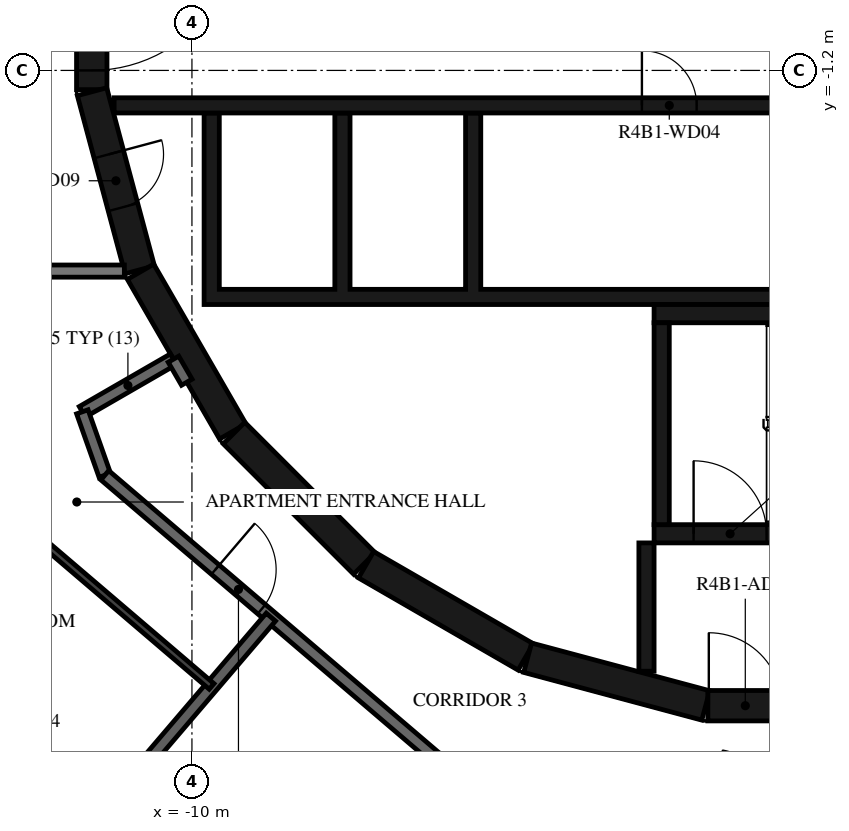
"""IFC4 building model, lengths in metres.
Left out: names, types, materials, properties, quantities, classifications, styles, units other than length and angle.
Written with IfcOpenShell. Run it as: python <this file> out.ifc"""

import sys

from ifc_helpers import new_model, si_unit, direction, frame, frame_2d, origin, place, context, subcontext, project, spatial, polyline, rectangle, outline, extrude, element, fill, save


model = new_model("IFC4")
c1 = context("Model", 3, precision=1e-05, world=origin(), true_north=direction((0.0, 1.0)))
c2 = subcontext(c1, "Body", "Model", "MODEL_VIEW")
j1 = project(units=[si_unit("LENGTHUNIT", "METRE"), si_unit("PLANEANGLEUNIT", "RADIAN")], contexts=[c1])
p1 = place(None, origin())
s1 = spatial("IfcSite", under=j1, at=p1, CompositionType="ELEMENT")
p2 = place(p1, origin())
s2 = spatial("IfcBuilding", under=s1, at=p2, CompositionType="ELEMENT")
p3 = place(p2, frame((0.0, 0.0, 162.2)))
s3 = spatial("IfcBuildingStorey", under=s2, at=p3, CompositionType="ELEMENT", Elevation=162.2)
p4 = place(p3, frame((-11.647, 1.516, 0.0), z_axis=(0.0, 0.0, 1.0), x_axis=(0.0, -1.0, 0.0)))
e1 = element("IfcWall", 1, at=p4, inside=s3, PredefinedType="SHEAR", context=c2, shape_type="SweptSolid", body=[
    extrude(rectangle(XDim=3.033, YDim=0.5, at=frame_2d((1.516, 0.0))), origin(), (0.0, 0.0, 1.0), 3.12),
])
p5 = place(p4, frame((0.316, 0.0, 0.0)))
e2 = element("IfcOpeningElement", 2, at=p5, cuts=e1, PredefinedType="OPENING", context=c2, shape_type="SweptSolid", body=[
    extrude(rectangle(XDim=2.4, YDim=2.1, at=frame_2d((1.2, 1.05))), frame((0.0, 0.26, 0.0), z_axis=(0.0, -1.0, 0.0), x_axis=(1.0, 0.0, 0.0)), (0.0, 0.0, 1.0), 0.52),
])
p6 = place(p3, frame((-11.643, -1.55, 0.0), z_axis=(0.0, 0.0, 1.0), x_axis=(0.258734743916, -0.965948410781, 0.0)))
e3 = element("IfcWall", 3, at=p6, inside=s3, PredefinedType="SHEAR", context=c2, shape_type="SweptSolid", body=[
    extrude(rectangle(XDim=3.033, YDim=0.5, at=frame_2d((1.516, 0.0))), origin(), (0.0, 0.0, 1.0), 3.12),
])
p7 = place(p6, frame((1.066, 0.0, 0.0)))
e4 = element("IfcOpeningElement", 4, at=p7, cuts=e3, PredefinedType="OPENING", context=c2, shape_type="SweptSolid", body=[
    extrude(rectangle(XDim=0.9, YDim=2.1, at=frame_2d((0.45, 1.05))), frame((0.0, 0.26, 0.0), z_axis=(0.0, -1.0, 0.0), x_axis=(1.0, 0.0, 0.0)), (0.0, 0.0, 1.0), 0.52),
])
p8 = place(p3, frame((-10.845, -4.51, 0.0), z_axis=(0.0, 0.0, 1.0), x_axis=(0.500087131594, -0.865975092491, 0.0)))
e5 = element("IfcWall", 5, at=p8, inside=s3, PredefinedType="SHEAR", context=c2, shape_type="SweptSolid", body=[
    extrude(rectangle(XDim=3.033, YDim=0.5, at=frame_2d((1.516, 0.0))), origin(), (0.0, 0.0, 1.0), 3.12),
])
p9 = place(p3, frame((-9.308, -7.164, 0.0), z_axis=(0.0, 0.0, 1.0), x_axis=(0.707106781187, -0.707106781187, 0.0)))
e6 = element("IfcWall", 6, at=p9, inside=s3, PredefinedType="SHEAR", context=c2, shape_type="SweptSolid", body=[
    extrude(rectangle(XDim=3.032, YDim=0.5, at=frame_2d((1.516, 0.0))), origin(), (0.0, 0.0, 1.0), 3.12),
])
for number, where, z_axis, x_axis in (
    (7, (-7.137, -9.329, 0.0), (0.0, 0.0, 1.0), (0.866, -0.5, 0.0)),
    (8, (-4.479, -10.858, 0.0), (0.0, 0.0, 1.0), (0.966, -0.259, 0.0)),
):
    element("IfcWall", number, at=place(p3, frame(where, z_axis=z_axis, x_axis=x_axis)), inside=s3, PredefinedType="SHEAR", context=c2, shape_type="SweptSolid", body=[
        extrude(rectangle(XDim=3.033, YDim=0.5, at=frame_2d((1.516, 0.0))), origin(), (0.0, 0.0, 1.0), 3.12),
    ])
p10 = place(p3, frame((-1.516, -11.647, 0.0), z_axis=(0.0, 0.0, 1.0), x_axis=(1.0, 0.0, 0.0)))
e9 = element("IfcWall", 9, at=p10, inside=s3, PredefinedType="SHEAR", context=c2, shape_type="SweptSolid", body=[
    extrude(rectangle(XDim=3.033, YDim=0.5, at=frame_2d((1.516, 0.0))), origin(), (0.0, 0.0, 1.0), 3.12),
])
p11 = place(p10, frame((0.016, 0.0, 0.0)))
e10 = element("IfcOpeningElement", 10, at=p11, cuts=e9, PredefinedType="OPENING", context=c2, shape_type="SweptSolid", body=[
    extrude(rectangle(XDim=1.2, YDim=2.1, at=frame_2d((0.6, 1.05))), frame((0.0, 0.26, 0.0), z_axis=(0.0, -1.0, 0.0), x_axis=(1.0, 0.0, 0.0)), (0.0, 0.0, 1.0), 0.52),
])
p12 = place(p3, frame((-2.275, -8.67, 0.0), z_axis=(0.0, 0.0, 1.0), x_axis=(0.0, 1.0, 0.0)))
e11 = element("IfcWall", 11, at=p12, inside=s3, PredefinedType="SHEAR", context=c2, shape_type="SweptSolid", body=[
    extrude(rectangle(XDim=3.32, YDim=0.25, at=frame_2d((1.66, 0.0))), origin(), (0.0, 0.0, 1.0), 3.12),
])
p13 = place(p3, frame((-2.4, -5.2, 0.0), z_axis=(0.0, 0.0, 1.0), x_axis=(1.0, 0.0, 0.0)))
e12 = element("IfcWall", 12, at=p13, inside=s3, PredefinedType="SHEAR", context=c2, shape_type="SweptSolid", body=[
    extrude(rectangle(XDim=7.05, YDim=0.3, at=frame_2d((3.525, 0.0))), origin(), (0.0, 0.0, 1.0), 3.12),
])
p14 = place(p3, frame((-2.4, -8.82, 0.0), z_axis=(0.0, 0.0, 1.0), x_axis=(1.0, 0.0, 0.0)))
e13 = element("IfcWall", 13, at=p14, inside=s3, PredefinedType="SHEAR", context=c2, shape_type="SweptSolid", body=[
    extrude(rectangle(XDim=2.5, YDim=0.3, at=frame_2d((1.25, 0.0))), origin(), (0.0, 0.0, 1.0), 3.12),
])
p15 = place(p14, frame((0.65, 0.0, 0.0)))
e14 = element("IfcOpeningElement", 14, at=p15, cuts=e13, PredefinedType="OPENING", context=c2, shape_type="SweptSolid", body=[
    extrude(rectangle(XDim=1.2, YDim=2.1, at=frame_2d((0.6, 1.05))), frame((0.0, 0.16, 0.0), z_axis=(0.0, -1.0, 0.0), x_axis=(1.0, 0.0, 0.0)), (0.0, 0.0, 1.0), 0.32),
])
p16 = place(p3, frame((-2.525, -8.97, 0.0), z_axis=(0.0, 0.0, 1.0), x_axis=(0.0, -1.0, 0.0)))
e15 = element("IfcWall", 15, at=p16, inside=s3, PredefinedType="SHEAR", context=c2, shape_type="SweptSolid", body=[
    extrude(rectangle(XDim=2.11, YDim=0.25, at=frame_2d((1.055, 0.0))), origin(), (0.0, 0.0, 1.0), 3.12),
])
p17 = place(p3, origin())
e16 = element("IfcWall", 16, at=p17, inside=s3, PredefinedType="SHEAR", context=c2, shape_type="SweptSolid", body=[
    extrude(outline(polyline([(9.8, -5.05), (9.8, -4.8), (9.8, -1.9), (9.55, -1.9), (9.55, -4.8), (7.65, -4.8), (7.65, -1.9), (7.4, -1.9), (7.4, -4.8), (5.5, -4.8), (5.5, -1.9), (5.25, -1.9), (5.25, -4.8), (3.35, -4.8), (3.35, -1.9), (3.1, -1.9), (3.1, -4.8), (1.2, -4.8), (1.2, -1.9), (0.95, -1.9), (0.95, -4.8), (-5.25, -4.8), (-5.25, -1.9), (-5.5, -1.9), (-5.5, -4.8), (-7.4, -4.8), (-7.4, -1.9), (-7.65, -1.9), (-7.65, -4.8), (-9.55, -4.8), (-9.55, -1.9), (-9.8, -1.9), (-9.8, -4.8), (-9.8, -5.05), (9.8, -5.05)])), origin(), (0.0, 0.0, 1.0), 3.12),
])
p18 = place(p3, frame((-11.28, -1.775, 0.0), z_axis=(0.0, 0.0, 1.0), x_axis=(1.0, 0.0, 0.0)))
e17 = element("IfcWall", 17, at=p18, inside=s3, PredefinedType="SHEAR", context=c2, shape_type="SweptSolid", body=[
    extrude(rectangle(XDim=14.38, YDim=0.25, at=frame_2d((7.19, 0.0))), origin(), (0.0, 0.0, 1.0), 3.12),
])
p19 = place(p18, frame((12.88, 0.0, 0.0)))
e18 = element("IfcOpeningElement", 18, at=p19, cuts=e17, PredefinedType="OPENING", context=c2, shape_type="SweptSolid", body=[
    extrude(rectangle(XDim=1.1, YDim=2.1, at=frame_2d((0.55, 1.05))), frame((0.0, 0.135, 0.0), z_axis=(0.0, -1.0, 0.0), x_axis=(1.0, 0.0, 0.0)), (0.0, 0.0, 1.0), 0.27),
])
p20 = place(p18, frame((8.68, 0.0, 0.0)))
e19 = element("IfcOpeningElement", 19, at=p20, cuts=e17, PredefinedType="OPENING", context=c2, shape_type="SweptSolid", body=[
    extrude(rectangle(XDim=0.9, YDim=2.1, at=frame_2d((0.45, 1.05))), frame((0.0, 0.135, 0.0), z_axis=(0.0, -1.0, 0.0), x_axis=(1.0, 0.0, 0.0)), (0.0, 0.0, 1.0), 0.27),
])
p21 = place(p3, frame((-10.303, -5.949, 0.0), z_axis=(0.0, 0.0, 1.0), x_axis=(-0.866021168401, -0.500007335828, 0.0)))
e20 = element("IfcWall", 20, at=p21, inside=s3, PredefinedType="STANDARD", context=c2, shape_type="SweptSolid", body=[
    extrude(rectangle(XDim=1.731, YDim=0.2, at=frame_2d((0.865, 0.0))), origin(), (0.0, 0.0, 1.0), 3.12),
])
p22 = place(p3, frame((-11.802, -6.814, 0.0), z_axis=(0.0, 0.0, 1.0), x_axis=(0.333904297771, -0.942606980629, 0.0)))
e21 = element("IfcWall", 21, at=p22, inside=s3, PredefinedType="STANDARD", context=c2, shape_type="SweptSolid", body=[
    extrude(rectangle(XDim=1.107, YDim=0.2, at=frame_2d((0.553, 0.0))), origin(), (0.0, 0.0, 1.0), 3.12),
])
p23 = place(p3, frame((-11.433, -7.858, 0.0), z_axis=(0.0, 0.0, 1.0), x_axis=(0.760412154545, -0.649440801937, 0.0)))
e22 = element("IfcWall", 22, at=p23, inside=s3, PredefinedType="STANDARD", context=c2, shape_type="SweptSolid", body=[
    extrude(rectangle(XDim=7.181, YDim=0.2, at=frame_2d((3.59, 0.0))), origin(), (0.0, 0.0, 1.0), 3.12),
])
p24 = place(p23, frame((2.39, 0.0, 0.0)))
e23 = element("IfcOpeningElement", 23, at=p24, cuts=e22, PredefinedType="OPENING", context=c2, shape_type="SweptSolid", body=[
    extrude(rectangle(XDim=1.0, YDim=2.1, at=frame_2d((0.5, 1.05))), frame((0.0, 0.11, 0.0), z_axis=(0.0, -1.0, 0.0), x_axis=(1.0, 0.0, 0.0)), (0.0, 0.0, 1.0), 0.22),
])
p25 = place(p3, frame((-10.303, -5.949, 0.0), z_axis=(0.0, 0.0, 1.0), x_axis=(0.499980071345, -0.866036909293, 0.0)))
e24 = element("IfcWall", 24, at=p25, inside=s3, PredefinedType="STANDARD", context=c2, shape_type="SweptSolid", body=[
    extrude(rectangle(XDim=0.438, YDim=0.2, at=frame_2d((0.219, 0.0))), origin(), (0.0, 0.0, 1.0), 3.12),
])
p26 = place(p3, frame((-14.213, -4.5, 0.0), z_axis=(0.0, 0.0, 1.0), x_axis=(1.0, 0.0, 0.0)))
e25 = element("IfcWall", 25, at=p26, inside=s3, PredefinedType="STANDARD", context=c2, shape_type="SweptSolid", body=[
    extrude(rectangle(XDim=3.102, YDim=0.2, at=frame_2d((1.551, 0.0))), origin(), (0.0, 0.0, 1.0), 3.12),
])
p27 = place(p3, frame((-12.441, -14.569, 0.0), z_axis=(0.0, 0.0, 1.0), x_axis=(0.649446013128, 0.760407703822, 0.0)))
e26 = element("IfcWall", 26, at=p27, inside=s3, PredefinedType="STANDARD", context=c2, shape_type="SweptSolid", body=[
    extrude(rectangle(XDim=5.758, YDim=0.2, at=frame_2d((2.879, 0.0))), origin(), (0.0, 0.0, 1.0), 3.12),
])
p28 = place(p3, frame((-12.713, -8.737, 0.0), z_axis=(0.0, 0.0, 1.0), x_axis=(0.760420863476, -0.649430604754, 0.0)))
e27 = element("IfcWall", 27, at=p28, inside=s3, PredefinedType="PARTITIONING", context=c2, shape_type="SweptSolid", body=[
    extrude(rectangle(XDim=3.992, YDim=0.12, at=frame_2d((1.996, 0.0))), origin(), (0.0, 0.0, 1.0), 3.12),
])
p29 = place(p3, frame((-15.677, -11.42, 0.0), z_axis=(0.0, 0.0, 1.0), x_axis=(0.785821888461, -0.618452875824, 0.0)))
e28 = element("IfcWall", 28, at=p29, inside=s3, PredefinedType="PARTITIONING", context=c2, shape_type="SweptSolid", body=[
    extrude(rectangle(XDim=4.507, YDim=0.12, at=frame_2d((2.254, 0.0))), origin(), (0.0, 0.0, 1.0), 3.12),
])
p30 = place(p29, frame((0.4, 0.0, 0.0)))
e29 = element("IfcOpeningElement", 29, at=p30, cuts=e28, PredefinedType="OPENING", context=c2, shape_type="SweptSolid", body=[
    extrude(rectangle(XDim=0.8, YDim=2.1, at=frame_2d((0.4, 1.05))), frame((0.0, 0.07, 0.0), z_axis=(0.0, -1.0, 0.0), x_axis=(1.0, 0.0, 0.0)), (0.0, 0.0, 1.0), 0.14),
])
p31 = place(p15, origin())
e30 = element("IfcDoor", 30, at=p31, inside=s3, OperationType="SINGLE_SWING_LEFT", PredefinedType="DOOR", context=c2, shape_type="SweptSolid", body=[
    extrude(rectangle(XDim=1.2, YDim=2.1, at=frame_2d((0.6, 1.05))), frame((0.0, 0.025, 0.0), z_axis=(0.0, -1.0, 0.0), x_axis=(1.0, 0.0, 0.0)), (0.0, 0.0, 1.0), 0.05),
])
fill(e14, e30)
p32 = place(p11, origin())
e31 = element("IfcDoor", 31, at=p32, inside=s3, OperationType="SINGLE_SWING_RIGHT", PredefinedType="DOOR", context=c2, shape_type="SweptSolid", body=[
    extrude(rectangle(XDim=1.2, YDim=2.1, at=frame_2d((0.6, 1.05))), frame((0.0, 0.025, 0.0), z_axis=(0.0, -1.0, 0.0), x_axis=(1.0, 0.0, 0.0)), (0.0, 0.0, 1.0), 0.05),
])
fill(e10, e31)
p33 = place(p5, origin())
e32 = element("IfcDoor", 32, at=p33, inside=s3, OperationType="DOUBLE_DOOR_SINGLE_SWING", PredefinedType="DOOR", context=c2, shape_type="SweptSolid", body=[
    extrude(rectangle(XDim=2.4, YDim=2.1, at=frame_2d((1.2, 1.05))), frame((0.0, 0.025, 0.0), z_axis=(0.0, -1.0, 0.0), x_axis=(1.0, 0.0, 0.0)), (0.0, 0.0, 1.0), 0.05),
])
fill(e2, e32)
p34 = place(p20, origin())
e33 = element("IfcDoor", 33, at=p34, inside=s3, OperationType="SINGLE_SWING_RIGHT", PredefinedType="DOOR", context=c2, shape_type="SweptSolid", body=[
    extrude(rectangle(XDim=0.9, YDim=2.1, at=frame_2d((0.45, 1.05))), frame((0.0, 0.025, 0.0), z_axis=(0.0, -1.0, 0.0), x_axis=(1.0, 0.0, 0.0)), (0.0, 0.0, 1.0), 0.05),
])
fill(e19, e33)
p35 = place(p7, origin())
e34 = element("IfcDoor", 34, at=p35, inside=s3, OperationType="SINGLE_SWING_LEFT", PredefinedType="DOOR", context=c2, shape_type="SweptSolid", body=[
    extrude(rectangle(XDim=0.9, YDim=2.1, at=frame_2d((0.45, 1.05))), frame((0.0, 0.025, 0.0), z_axis=(0.0, -1.0, 0.0), x_axis=(1.0, 0.0, 0.0)), (0.0, 0.0, 1.0), 0.05),
])
fill(e4, e34)
p36 = place(p24, origin())
e35 = element("IfcDoor", 35, at=p36, inside=s3, OperationType="SINGLE_SWING_RIGHT", PredefinedType="DOOR", context=c2, shape_type="SweptSolid", body=[
    extrude(rectangle(XDim=1.0, YDim=2.1, at=frame_2d((0.5, 1.05))), frame((0.0, 0.025, 0.0), z_axis=(0.0, -1.0, 0.0), x_axis=(1.0, 0.0, 0.0)), (0.0, 0.0, 1.0), 0.05),
])
fill(e23, e35)
save(model, sys.argv[1])
